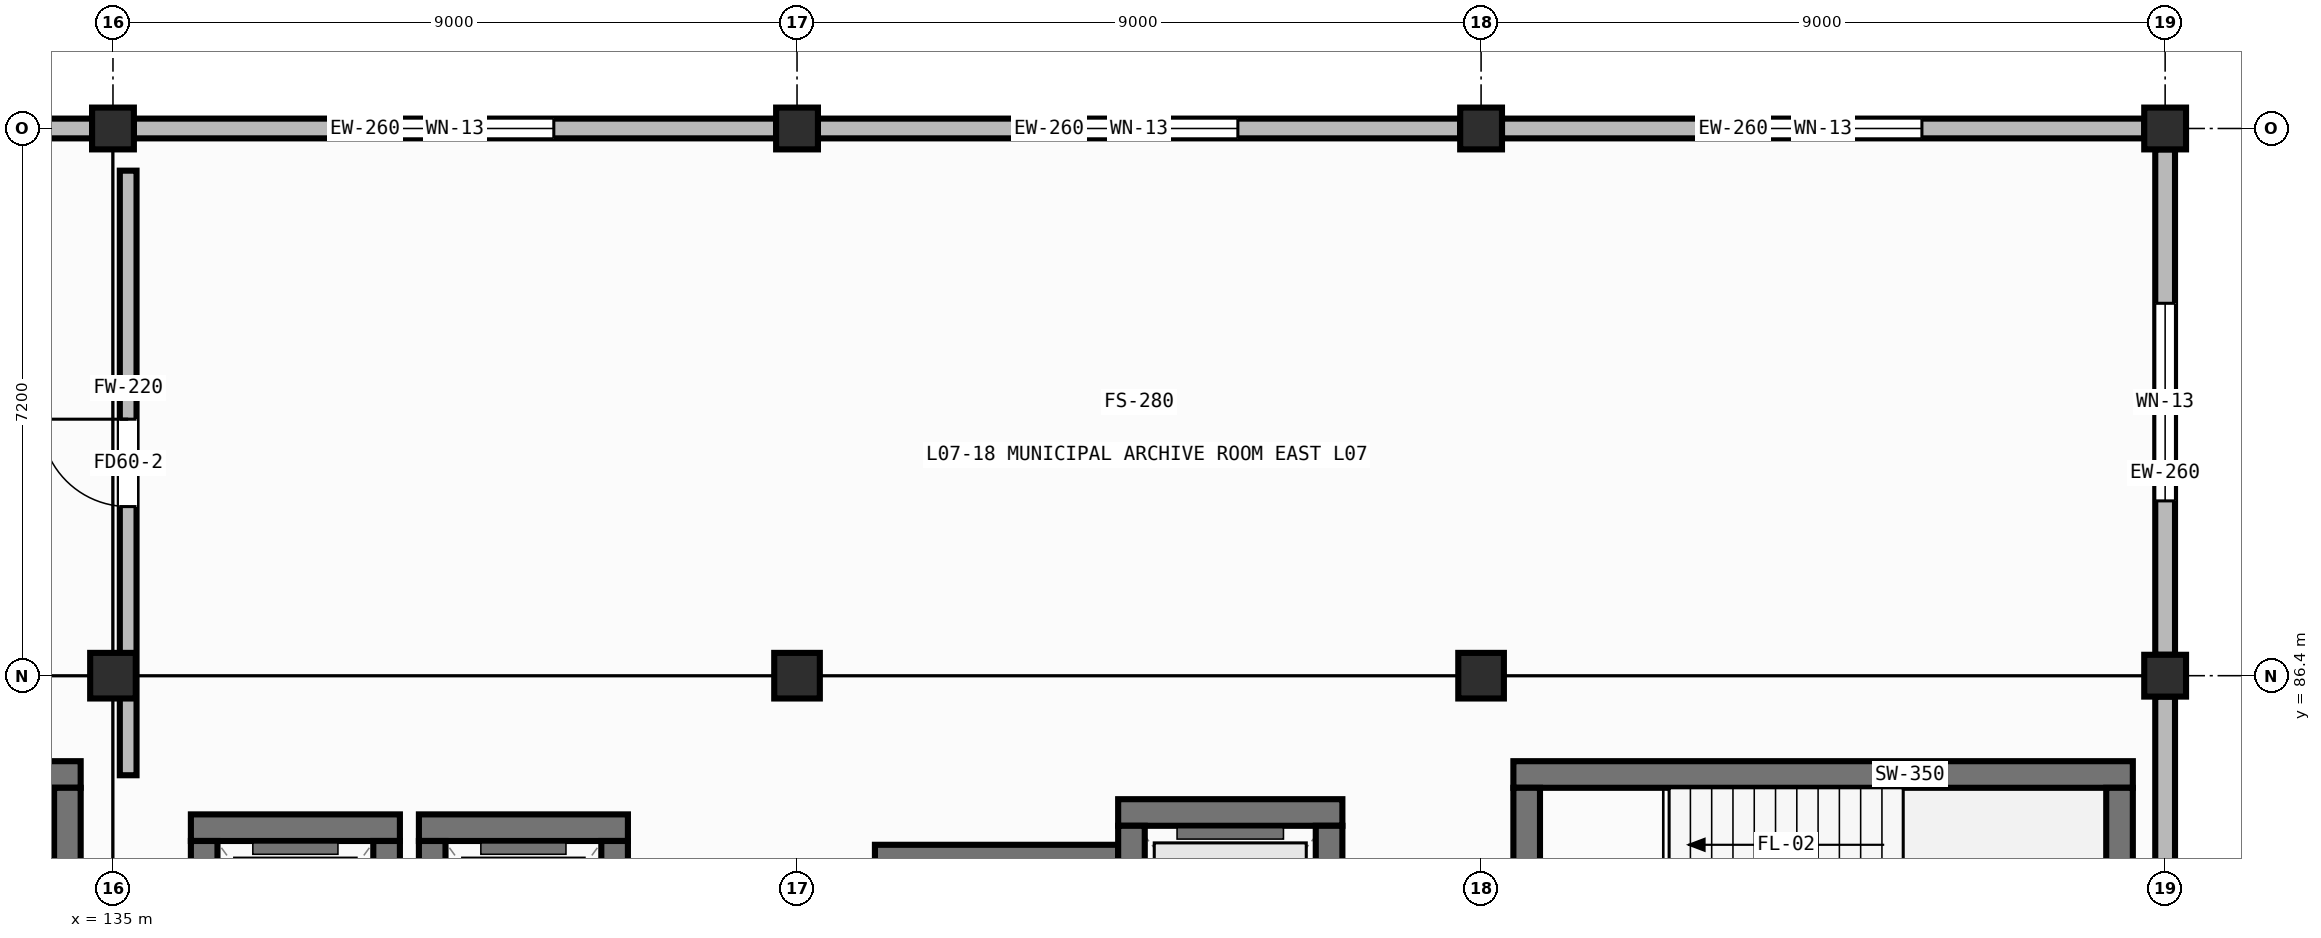
"""IFC4 building model, lengths in metres.
Left out: names, types, materials, properties, quantities, classifications, styles, units other than length and angle.
Written with IfcOpenShell. Run it as: python <this file> out.ifc"""

import sys

from ifc_helpers import new_model, si_unit, direction, frame, frame_2d, origin, origin_2d, place, context, subcontext, project, spatial, rectangle, hollow_rectangle, extrude, element, fill, save


model = new_model("IFC4")
c1 = context("Model", 3, precision=1e-05, world=origin(), true_north=direction((0.0, 1.0)))
c2 = subcontext(c1, "Body", "Model", "MODEL_VIEW")
j1 = project(units=[si_unit("LENGTHUNIT", "METRE"), si_unit("PLANEANGLEUNIT", "RADIAN")], contexts=[c1])
p1 = place(None, origin())
s1 = spatial("IfcSite", under=j1, at=p1, CompositionType="ELEMENT")
p2 = place(p1, origin())
s2 = spatial("IfcBuilding", under=s1, at=p2, CompositionType="ELEMENT")
p3 = place(p2, frame((0.0, 0.0, 24.2)))
s3 = spatial("IfcBuildingStorey", under=s2, at=p3, CompositionType="ELEMENT", Elevation=24.2)
p4 = place(p3, frame((135.0, 86.4, 0.0), z_axis=(0.0, 0.0, 1.0), x_axis=(1.0, 0.0, 0.0)))
e1 = element("IfcColumn", 1, at=p4, inside=s3, PredefinedType="COLUMN", context=c2, shape_type="SweptSolid", body=[
    extrude(hollow_rectangle(XDim=0.6, YDim=0.6, WallThickness=0.025, at=origin_2d()), origin(), (0.0, 0.0, 1.0), 3.6),
])
p5 = place(p3, frame((135.0, 93.6, 0.0), z_axis=(0.0, 0.0, 1.0), x_axis=(1.0, 0.0, 0.0)))
e2 = element("IfcColumn", 2, at=p5, inside=s3, PredefinedType="COLUMN", context=c2, shape_type="SweptSolid", body=[
    extrude(hollow_rectangle(XDim=0.55, YDim=0.55, WallThickness=0.022, at=origin_2d()), origin(), (0.0, 0.0, 1.0), 3.6),
])
p6 = place(p3, frame((144.0, 86.4, 0.0), z_axis=(0.0, 0.0, 1.0), x_axis=(1.0, 0.0, 0.0)))
e3 = element("IfcColumn", 3, at=p6, inside=s3, PredefinedType="COLUMN", context=c2, shape_type="SweptSolid", body=[
    extrude(hollow_rectangle(XDim=0.6, YDim=0.6, WallThickness=0.025, at=origin_2d()), origin(), (0.0, 0.0, 1.0), 3.6),
])
p7 = place(p3, frame((144.0, 93.6, 0.0), z_axis=(0.0, 0.0, 1.0), x_axis=(1.0, 0.0, 0.0)))
e4 = element("IfcColumn", 4, at=p7, inside=s3, PredefinedType="COLUMN", context=c2, shape_type="SweptSolid", body=[
    extrude(hollow_rectangle(XDim=0.55, YDim=0.55, WallThickness=0.022, at=origin_2d()), origin(), (0.0, 0.0, 1.0), 3.6),
])
p8 = place(p3, frame((153.0, 86.4, 0.0), z_axis=(0.0, 0.0, 1.0), x_axis=(1.0, 0.0, 0.0)))
e5 = element("IfcColumn", 5, at=p8, inside=s3, PredefinedType="COLUMN", context=c2, shape_type="SweptSolid", body=[
    extrude(hollow_rectangle(XDim=0.6, YDim=0.6, WallThickness=0.025, at=origin_2d()), origin(), (0.0, 0.0, 1.0), 3.6),
])
for number, where, z_axis, x_axis in (
    (6, (153.0, 93.6, 0.0), (0.0, 0.0, 1.0), (1.0, 0.0, 0.0)),
    (7, (162.0, 86.4, 0.0), (0.0, 0.0, 1.0), (1.0, 0.0, 0.0)),
    (8, (162.0, 93.6, 0.0), (0.0, 0.0, 1.0), (1.0, 0.0, 0.0)),
):
    element("IfcColumn", number, at=place(p3, frame(where, z_axis=z_axis, x_axis=x_axis)), inside=s3, PredefinedType="COLUMN", context=c2, shape_type="SweptSolid", body=[
        extrude(hollow_rectangle(XDim=0.55, YDim=0.55, WallThickness=0.022, at=origin_2d()), origin(), (0.0, 0.0, 1.0), 3.6),
    ])
p9 = place(p3, frame((134.725, 93.6, 0.0), z_axis=(0.0, 0.0, 1.0), x_axis=(-1.0, 0.0, 0.0)))
e9 = element("IfcWall", 9, at=p9, inside=s3, PredefinedType="STANDARD", context=c2, shape_type="SweptSolid", body=[
    extrude(rectangle(XDim=8.45, YDim=0.26, at=frame_2d((4.225, 0.0))), origin(), (0.0, 0.0, 1.0), 2.92),
])
p10 = place(p3, frame((143.725, 93.6, 0.0), z_axis=(0.0, 0.0, 1.0), x_axis=(-1.0, 0.0, 0.0)))
e10 = element("IfcWall", 10, at=p10, inside=s3, PredefinedType="STANDARD", context=c2, shape_type="SweptSolid", body=[
    extrude(rectangle(XDim=8.45, YDim=0.26, at=frame_2d((4.225, 0.0))), origin(), (0.0, 0.0, 1.0), 2.92),
])
p11 = place(p10, frame((2.925, 0.0, 0.85)))
e11 = element("IfcOpeningElement", 11, at=p11, cuts=e10, PredefinedType="OPENING", context=c2, shape_type="SweptSolid", body=[
    extrude(rectangle(XDim=2.6, YDim=1.6, at=frame_2d((1.3, 0.8))), frame((0.0, 0.142, 0.0), z_axis=(0.0, -1.0, 0.0), x_axis=(1.0, 0.0, 0.0)), (0.0, 0.0, 1.0), 0.284),
])
p12 = place(p3, frame((152.725, 93.6, 0.0), z_axis=(0.0, 0.0, 1.0), x_axis=(-1.0, 0.0, 0.0)))
e12 = element("IfcWall", 12, at=p12, inside=s3, PredefinedType="STANDARD", context=c2, shape_type="SweptSolid", body=[
    extrude(rectangle(XDim=8.45, YDim=0.26, at=frame_2d((4.225, 0.0))), origin(), (0.0, 0.0, 1.0), 2.92),
])
p13 = place(p12, frame((2.925, 0.0, 0.85)))
e13 = element("IfcOpeningElement", 13, at=p13, cuts=e12, PredefinedType="OPENING", context=c2, shape_type="SweptSolid", body=[
    extrude(rectangle(XDim=2.6, YDim=1.6, at=frame_2d((1.3, 0.8))), frame((0.0, 0.142, 0.0), z_axis=(0.0, -1.0, 0.0), x_axis=(1.0, 0.0, 0.0)), (0.0, 0.0, 1.0), 0.284),
])
p14 = place(p3, frame((161.725, 93.6, 0.0), z_axis=(0.0, 0.0, 1.0), x_axis=(-1.0, 0.0, 0.0)))
e14 = element("IfcWall", 14, at=p14, inside=s3, PredefinedType="STANDARD", context=c2, shape_type="SweptSolid", body=[
    extrude(rectangle(XDim=8.45, YDim=0.26, at=frame_2d((4.225, 0.0))), origin(), (0.0, 0.0, 1.0), 2.92),
])
p15 = place(p14, frame((2.925, 0.0, 0.85)))
e15 = element("IfcOpeningElement", 15, at=p15, cuts=e14, PredefinedType="OPENING", context=c2, shape_type="SweptSolid", body=[
    extrude(rectangle(XDim=2.6, YDim=1.6, at=frame_2d((1.3, 0.8))), frame((0.0, 0.142, 0.0), z_axis=(0.0, -1.0, 0.0), x_axis=(1.0, 0.0, 0.0)), (0.0, 0.0, 1.0), 0.284),
])
p16 = place(p3, frame((162.0, 86.125, 0.0), z_axis=(0.0, 0.0, 1.0), x_axis=(0.0, -1.0, 0.0)))
e16 = element("IfcWall", 16, at=p16, inside=s3, PredefinedType="STANDARD", context=c2, shape_type="SweptSolid", body=[
    extrude(rectangle(XDim=6.65, YDim=0.26, at=frame_2d((3.325, 0.0))), origin(), (0.0, 0.0, 1.0), 2.92),
])
p17 = place(p3, frame((162.0, 93.325, 0.0), z_axis=(0.0, 0.0, 1.0), x_axis=(0.0, -1.0, 0.0)))
e17 = element("IfcWall", 17, at=p17, inside=s3, PredefinedType="STANDARD", context=c2, shape_type="SweptSolid", body=[
    extrude(rectangle(XDim=6.65, YDim=0.26, at=frame_2d((3.325, 0.0))), origin(), (0.0, 0.0, 1.0), 2.92),
])
p18 = place(p17, frame((2.025, 0.0, 0.85)))
e18 = element("IfcOpeningElement", 18, at=p18, cuts=e17, PredefinedType="OPENING", context=c2, shape_type="SweptSolid", body=[
    extrude(rectangle(XDim=2.6, YDim=1.6, at=frame_2d((1.3, 0.8))), frame((0.0, 0.142, 0.0), z_axis=(0.0, -1.0, 0.0), x_axis=(1.0, 0.0, 0.0)), (0.0, 0.0, 1.0), 0.284),
])
p19 = place(p3, frame((126.425, 85.1, 0.0), z_axis=(0.0, 0.0, 1.0), x_axis=(1.0, 0.0, 0.0)))
e19 = element("IfcWall", 19, at=p19, inside=s3, PredefinedType="SHEAR", context=c2, shape_type="SweptSolid", body=[
    extrude(rectangle(XDim=8.15, YDim=0.35, at=frame_2d((4.075, 0.0))), origin(), (0.0, 0.0, 1.0), 3.32),
])
p20 = place(p3, frame((134.4, 81.375, 0.0), z_axis=(0.0, 0.0, 1.0), x_axis=(0.0, 1.0, 0.0)))
e20 = element("IfcWall", 20, at=p20, inside=s3, PredefinedType="SHEAR", context=c2, shape_type="SweptSolid", body=[
    extrude(rectangle(XDim=3.55, YDim=0.35, at=frame_2d((1.775, 0.0))), origin(), (0.0, 0.0, 1.0), 3.32),
])
p21 = place(p3, frame((153.425, 85.1, 0.0), z_axis=(0.0, 0.0, 1.0), x_axis=(1.0, 0.0, 0.0)))
e21 = element("IfcWall", 21, at=p21, inside=s3, PredefinedType="SHEAR", context=c2, shape_type="SweptSolid", body=[
    extrude(rectangle(XDim=8.15, YDim=0.35, at=frame_2d((4.075, 0.0))), origin(), (0.0, 0.0, 1.0), 3.32),
])
for number, where, z_axis, x_axis in (
    (22, (153.6, 81.375, 0.0), (0.0, 0.0, 1.0), (0.0, 1.0, 0.0)),
    (23, (161.4, 81.375, 0.0), (0.0, 0.0, 1.0), (0.0, 1.0, 0.0)),
):
    element("IfcWall", number, at=place(p3, frame(where, z_axis=z_axis, x_axis=x_axis)), inside=s3, PredefinedType="SHEAR", context=c2, shape_type="SweptSolid", body=[
        extrude(rectangle(XDim=3.55, YDim=0.35, at=frame_2d((1.775, 0.0))), origin(), (0.0, 0.0, 1.0), 3.32),
    ])
p22 = place(p3, frame((136.025, 84.4, 0.0), z_axis=(0.0, 0.0, 1.0), x_axis=(1.0, 0.0, 0.0)))
e24 = element("IfcWall", 24, at=p22, inside=s3, PredefinedType="SHEAR", context=c2, shape_type="SweptSolid", body=[
    extrude(rectangle(XDim=2.75, YDim=0.35, at=frame_2d((1.375, 0.0))), origin(), (0.0, 0.0, 1.0), 3.32),
])
for number, where, z_axis, x_axis in (
    (25, (136.2, 81.375, 0.0), (0.0, 0.0, 1.0), (0.0, 1.0, 0.0)),
    (26, (138.6, 81.375, 0.0), (0.0, 0.0, 1.0), (0.0, 1.0, 0.0)),
):
    element("IfcWall", number, at=place(p3, frame(where, z_axis=z_axis, x_axis=x_axis)), inside=s3, PredefinedType="SHEAR", context=c2, shape_type="SweptSolid", body=[
        extrude(rectangle(XDim=2.85, YDim=0.35, at=frame_2d((1.425, 0.0))), origin(), (0.0, 0.0, 1.0), 3.32),
    ])
p23 = place(p3, frame((139.025, 84.4, 0.0), z_axis=(0.0, 0.0, 1.0), x_axis=(1.0, 0.0, 0.0)))
e27 = element("IfcWall", 27, at=p23, inside=s3, PredefinedType="SHEAR", context=c2, shape_type="SweptSolid", body=[
    extrude(rectangle(XDim=2.75, YDim=0.35, at=frame_2d((1.375, 0.0))), origin(), (0.0, 0.0, 1.0), 3.32),
])
for number, where, z_axis, x_axis in (
    (28, (139.2, 81.375, 0.0), (0.0, 0.0, 1.0), (0.0, 1.0, 0.0)),
    (29, (141.6, 81.375, 0.0), (0.0, 0.0, 1.0), (0.0, 1.0, 0.0)),
):
    element("IfcWall", number, at=place(p3, frame(where, z_axis=z_axis, x_axis=x_axis)), inside=s3, PredefinedType="SHEAR", context=c2, shape_type="SweptSolid", body=[
        extrude(rectangle(XDim=2.85, YDim=0.35, at=frame_2d((1.425, 0.0))), origin(), (0.0, 0.0, 1.0), 3.32),
    ])
p24 = place(p3, frame((145.025, 84.0, 0.0), z_axis=(0.0, 0.0, 1.0), x_axis=(1.0, 0.0, 0.0)))
e30 = element("IfcWall", 30, at=p24, inside=s3, PredefinedType="SHEAR", context=c2, shape_type="SweptSolid", body=[
    extrude(rectangle(XDim=3.2, YDim=0.35, at=frame_2d((1.6, 0.0))), origin(), (0.0, 0.0, 1.0), 3.32),
])
p25 = place(p3, frame((148.225, 84.6, 0.0), z_axis=(0.0, 0.0, 1.0), x_axis=(1.0, 0.0, 0.0)))
e31 = element("IfcWall", 31, at=p25, inside=s3, PredefinedType="SHEAR", context=c2, shape_type="SweptSolid", body=[
    extrude(rectangle(XDim=2.95, YDim=0.35, at=frame_2d((1.475, 0.0))), origin(), (0.0, 0.0, 1.0), 3.32),
])
for number, where, z_axis, x_axis in (
    (32, (148.4, 81.375, 0.0), (0.0, 0.0, 1.0), (0.0, 1.0, 0.0)),
    (33, (151.0, 81.375, 0.0), (0.0, 0.0, 1.0), (0.0, 1.0, 0.0)),
):
    element("IfcWall", number, at=place(p3, frame(where, z_axis=z_axis, x_axis=x_axis)), inside=s3, PredefinedType="SHEAR", context=c2, shape_type="SweptSolid", body=[
        extrude(rectangle(XDim=3.05, YDim=0.35, at=frame_2d((1.525, 0.0))), origin(), (0.0, 0.0, 1.0), 3.32),
    ])
p26 = place(p3, frame((135.2, 85.09, 0.0), z_axis=(0.0, 0.0, 1.0), x_axis=(0.0, 1.0, 0.0)))
e34 = element("IfcWall", 34, at=p26, inside=s3, PredefinedType="PARTITIONING", context=c2, shape_type="SweptSolid", body=[
    extrude(rectangle(XDim=7.955, YDim=0.22, at=frame_2d((3.978, 0.0))), origin(), (0.0, 0.0, 1.0), 2.6),
])
p27 = place(p26, frame((3.535, 0.0, 0.0)))
e35 = element("IfcOpeningElement", 35, at=p27, cuts=e34, PredefinedType="OPENING", context=c2, shape_type="SweptSolid", body=[
    extrude(rectangle(XDim=1.15, YDim=2.1, at=frame_2d((0.575, 1.05))), frame((0.0, 0.122, 0.0), z_axis=(0.0, -1.0, 0.0), x_axis=(1.0, 0.0, 0.0)), (0.0, 0.0, 1.0), 0.244),
])
p28 = place(p11, origin())
e36 = element("IfcWindow", 36, at=p28, inside=s3, PartitioningType="DOUBLE_PANEL_VERTICAL", PredefinedType="WINDOW", context=c2, shape_type="SweptSolid", body=[
    extrude(rectangle(XDim=2.6, YDim=1.6, at=frame_2d((1.3, 0.8))), frame((0.0, 0.03, 0.0), z_axis=(0.0, -1.0, 0.0), x_axis=(1.0, 0.0, 0.0)), (0.0, 0.0, 1.0), 0.06),
])
fill(e11, e36)
p29 = place(p13, origin())
e37 = element("IfcWindow", 37, at=p29, inside=s3, PartitioningType="DOUBLE_PANEL_VERTICAL", PredefinedType="WINDOW", context=c2, shape_type="SweptSolid", body=[
    extrude(rectangle(XDim=2.6, YDim=1.6, at=frame_2d((1.3, 0.8))), frame((0.0, 0.03, 0.0), z_axis=(0.0, -1.0, 0.0), x_axis=(1.0, 0.0, 0.0)), (0.0, 0.0, 1.0), 0.06),
])
fill(e13, e37)
p30 = place(p15, origin())
e38 = element("IfcWindow", 38, at=p30, inside=s3, PartitioningType="DOUBLE_PANEL_VERTICAL", PredefinedType="WINDOW", context=c2, shape_type="SweptSolid", body=[
    extrude(rectangle(XDim=2.6, YDim=1.6, at=frame_2d((1.3, 0.8))), frame((0.0, 0.03, 0.0), z_axis=(0.0, -1.0, 0.0), x_axis=(1.0, 0.0, 0.0)), (0.0, 0.0, 1.0), 0.06),
])
fill(e15, e38)
p31 = place(p18, origin())
e39 = element("IfcWindow", 39, at=p31, inside=s3, PartitioningType="DOUBLE_PANEL_VERTICAL", PredefinedType="WINDOW", context=c2, shape_type="SweptSolid", body=[
    extrude(rectangle(XDim=2.6, YDim=1.6, at=frame_2d((1.3, 0.8))), frame((0.0, 0.03, 0.0), z_axis=(0.0, -1.0, 0.0), x_axis=(1.0, 0.0, 0.0)), (0.0, 0.0, 1.0), 0.06),
])
fill(e18, e39)
p32 = place(p27, origin())
e40 = element("IfcDoor", 40, at=p32, inside=s3, OperationType="SINGLE_SWING_RIGHT", PredefinedType="DOOR", context=c2, shape_type="SweptSolid", body=[
    extrude(rectangle(XDim=1.15, YDim=2.1, at=frame_2d((0.575, 1.05))), frame((0.0, 0.025, 0.0), z_axis=(0.0, -1.0, 0.0), x_axis=(1.0, 0.0, 0.0)), (0.0, 0.0, 1.0), 0.05),
])
fill(e35, e40)
save(model, sys.argv[1])
